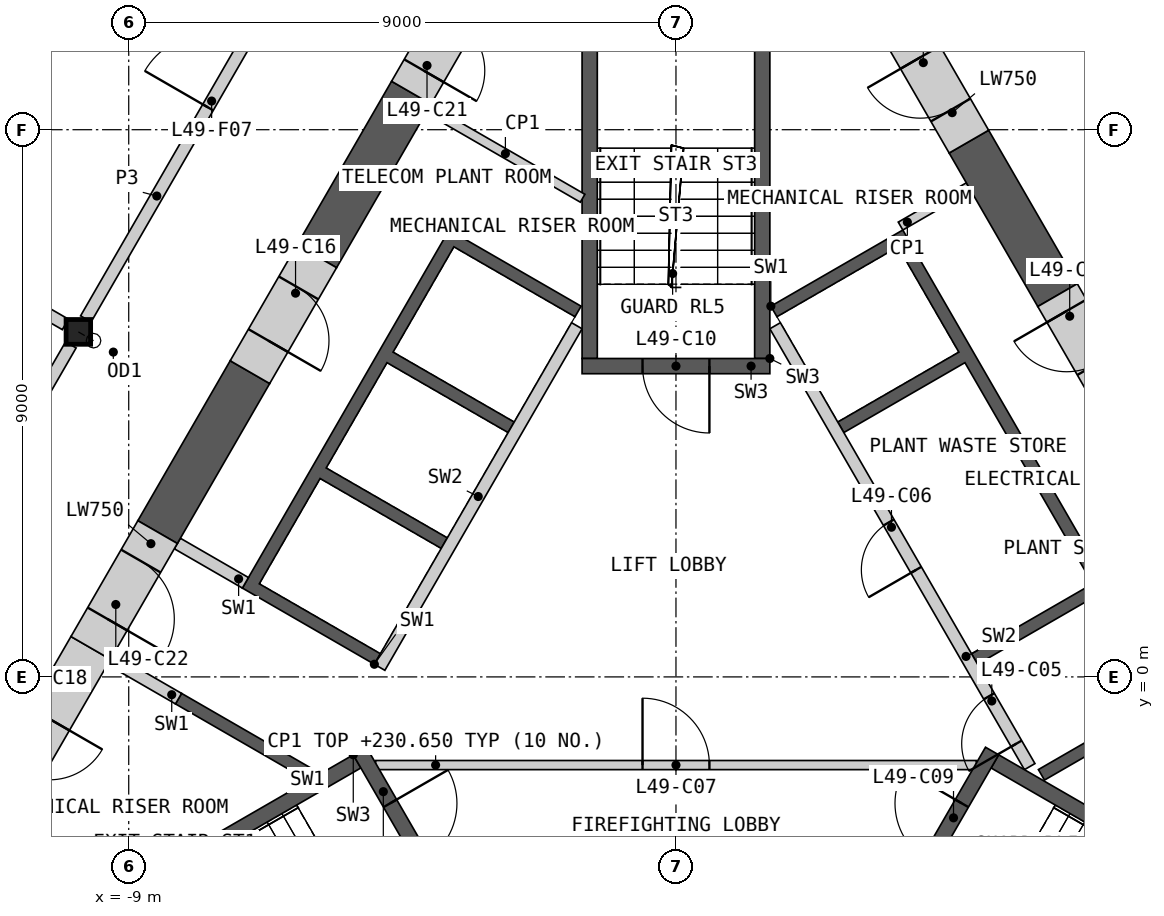
"""IFC4 building model, lengths in metres.
Left out: names, types, materials, properties, quantities, classifications, styles, units other than length and angle.
Written with IfcOpenShell. Run it as: python <this file> out.ifc"""

import sys

from ifc_helpers import new_model, si_unit, direction, frame, frame_2d, origin, origin_2d, place, context, subcontext, project, spatial, polyline, rectangle, i_section, outline, extrude, element, fill, save


model = new_model("IFC4")
c1 = context("Model", 3, precision=1e-05, world=origin(), true_north=direction((0.0, 1.0)))
c2 = subcontext(c1, "Body", "Model", "MODEL_VIEW")
j1 = project(units=[si_unit("LENGTHUNIT", "METRE"), si_unit("PLANEANGLEUNIT", "RADIAN")], contexts=[c1])
p1 = place(None, origin())
s1 = spatial("IfcSite", under=j1, at=p1, CompositionType="ELEMENT")
p2 = place(p1, origin())
s2 = spatial("IfcBuilding", under=s1, at=p2, CompositionType="ELEMENT")
p3 = place(p2, frame((0.0, 0.0, 226.0)))
s3 = spatial("IfcBuildingStorey", under=s2, at=p3, CompositionType="ELEMENT", Elevation=226.0)
p4 = place(p3, frame((-9.828, 5.675, 0.0), z_axis=(0.049916818753, -0.028858160841, 0.998336375055), x_axis=(0.500502949238, 0.865734831114, 0.0)))
e1 = element("IfcColumn", 1, at=p4, inside=s3, PredefinedType="COLUMN", context=c2, shape_type="SweptSolid", body=[
    extrude(i_section(OverallWidth=0.404, OverallDepth=0.407, WebThickness=0.027, FlangeThickness=0.044, at=origin_2d()), frame((0.0, 0.0, 0.012)), (0.0, 0.0, 1.0), 4.985),
])
p5 = place(p3, origin())
e2 = element("IfcWall", 2, at=p5, inside=s3, PredefinedType="SHEAR", context=c2, shape_type="SweptSolid", body=[
    extrude(outline(polyline([(1.561, 6.097), (3.731, 7.35), (7.131, 1.461), (4.96, 0.208), (4.861, 0.381), (6.852, 1.531), (4.752, 5.169), (2.76, 4.019), (2.66, 4.192), (4.652, 5.342), (3.652, 7.074), (1.66, 5.924), (1.561, 6.097)])), origin(), (0.0, 0.0, 1.0), 4.65),
])
p6 = place(p3, origin())
e3 = element("IfcWall", 3, at=p6, inside=s3, PredefinedType="SHEAR", context=c2, shape_type="SweptSolid", body=[
    extrude(outline(polyline([(8.231, -0.444), (6.061, -1.697), (5.96, -1.524), (8.131, -0.271), (8.231, -0.444)])), origin(), (0.0, 0.0, 1.0), 4.65),
])
p7 = place(p3, frame((5.817, -1.476, 0.0), z_axis=(0.0, 0.0, 1.0), x_axis=(-0.500002616675, 0.866023893041, 0.0)))
e4 = element("IfcWall", 4, at=p7, inside=s3, PredefinedType="SOLIDWALL", context=c2, shape_type="SweptSolid", body=[
    extrude(rectangle(XDim=8.373, YDim=0.2, at=frame_2d((4.187, 0.0))), origin(), (0.0, 0.0, 1.0), 4.65),
])
p8 = place(p7, frame((0.437, 0.0, 0.0)))
e5 = element("IfcOpeningElement", 5, at=p8, cuts=e4, PredefinedType="OPENING", context=c2, shape_type="SweptSolid", body=[
    extrude(rectangle(XDim=0.9, YDim=2.1, at=frame_2d((0.45, 1.05))), frame((0.0, 0.11, 0.0), z_axis=(0.0, -1.0, 0.0), x_axis=(1.0, 0.0, 0.0)), (0.0, 0.0, 1.0), 0.22),
])
p9 = place(p7, frame((3.737, 0.0, 0.0)))
e6 = element("IfcOpeningElement", 6, at=p9, cuts=e4, PredefinedType="OPENING", context=c2, shape_type="SweptSolid", body=[
    extrude(rectangle(XDim=0.9, YDim=2.1, at=frame_2d((0.45, 1.05))), frame((0.0, 0.11, 0.0), z_axis=(0.0, -1.0, 0.0), x_axis=(1.0, 0.0, 0.0)), (0.0, 0.0, 1.0), 0.22),
])
p10 = place(p3, origin())
e7 = element("IfcWall", 7, at=p10, inside=s3, PredefinedType="SHEAR", context=c2, shape_type="SweptSolid", body=[
    extrude(outline(polyline([(-6.061, -1.697), (-8.231, -0.444), (-8.131, -0.271), (-5.96, -1.524), (-6.061, -1.697)])), origin(), (0.0, 0.0, 1.0), 4.65),
])
p11 = place(p3, origin())
e8 = element("IfcWall", 8, at=p11, inside=s3, PredefinedType="SHEAR", context=c2, shape_type="SweptSolid", body=[
    extrude(outline(polyline([(-4.96, 0.208), (-7.131, 1.461), (-3.731, 7.35), (-1.561, 6.097), (-1.66, 5.924), (-3.652, 7.074), (-4.652, 5.342), (-2.66, 4.192), (-2.76, 4.019), (-4.752, 5.169), (-5.752, 3.437), (-3.76, 2.287), (-3.861, 2.113), (-5.852, 3.263), (-6.852, 1.531), (-4.861, 0.381), (-4.96, 0.208)])), origin(), (0.0, 0.0, 1.0), 4.65),
])
p12 = place(p3, frame((-1.631, 5.776, 0.0), z_axis=(0.0, 0.0, 1.0), x_axis=(-0.499992876559, -0.866029516466, 0.0)))
e9 = element("IfcWall", 9, at=p12, inside=s3, PredefinedType="SOLIDWALL", context=c2, shape_type="SweptSolid", body=[
    extrude(rectangle(XDim=6.486, YDim=0.2, at=frame_2d((3.243, 0.0))), origin(), (0.0, 0.0, 1.0), 4.65),
])
for number, where, z_axis, x_axis in (
    (10, (-7.081, 1.548, 0.0), (0.0, 0.0, 1.0), (-0.866, 0.5, 0.0)),
    (11, (-8.181, -0.357, 0.0), (0.0, 0.0, 1.0), (-0.866, 0.5, 0.0)),
):
    element("IfcWall", number, at=place(p3, frame(where, z_axis=z_axis, x_axis=x_axis)), inside=s3, PredefinedType="SHEAR", context=c2, shape_type="SweptSolid", body=[
        extrude(rectangle(XDim=1.293, YDim=0.2, at=frame_2d((0.646, 0.0))), origin(), (0.0, 0.0, 1.0), 4.65),
    ])
p13 = place(p3, frame((-4.941, -1.45, 0.0), z_axis=(0.0, 0.0, 1.0), x_axis=(1.0, 0.0, 0.0)))
e12 = element("IfcWall", 12, at=p13, inside=s3, PredefinedType="PARTITIONING", context=c2, shape_type="SweptSolid", body=[
    extrude(rectangle(XDim=9.882, YDim=0.15, at=frame_2d((4.941, 0.0))), origin(), (0.0, 0.0, 1.0), 4.65),
])
p14 = place(p13, frame((4.391, 0.0, 0.0)))
e13 = element("IfcOpeningElement", 13, at=p14, cuts=e12, PredefinedType="OPENING", context=c2, shape_type="SweptSolid", body=[
    extrude(rectangle(XDim=1.1, YDim=2.1, at=frame_2d((0.55, 1.05))), frame((0.0, 0.085, 0.0), z_axis=(0.0, -1.0, 0.0), x_axis=(1.0, 0.0, 0.0)), (0.0, 0.0, 1.0), 0.17),
])
p15 = place(p3, origin())
e14 = element("IfcWall", 14, at=p15, inside=s3, PredefinedType="SHEAR", context=c2, shape_type="SweptSolid", body=[
    extrude(outline(polyline([(-5.307, -1.281), (-10.374, -4.206), (-10.032, -4.298), (-5.182, -1.498), (-5.307, -1.281)])), origin(), (0.0, 0.0, 1.0), 4.65),
])
p16 = place(p3, frame((-5.199, -1.219, 0.0), z_axis=(0.0, 0.0, 1.0), x_axis=(0.499982516597, -0.866035497597, 0.0)))
e15 = element("IfcWall", 15, at=p16, inside=s3, PredefinedType="SHEAR", context=c2, shape_type="SweptSolid", body=[
    extrude(rectangle(XDim=3.088, YDim=0.25, at=frame_2d((1.544, 0.0))), origin(), (0.0, 0.0, 1.0), 4.65),
])
p17 = place(p16, frame((0.994, 0.0, 0.0)))
e16 = element("IfcOpeningElement", 16, at=p17, cuts=e15, PredefinedType="OPENING", context=c2, shape_type="SweptSolid", body=[
    extrude(rectangle(XDim=1.1, YDim=2.1, at=frame_2d((0.55, 1.05))), frame((0.0, 0.135, 0.0), z_axis=(0.0, -1.0, 0.0), x_axis=(1.0, 0.0, 0.0)), (0.0, 0.0, 1.0), 0.27),
])
p18 = place(p3, origin())
e17 = element("IfcWall", 17, at=p18, inside=s3, PredefinedType="SHEAR", context=c2, shape_type="SweptSolid", body=[
    extrude(outline(polyline([(10.032, -4.298), (10.374, -4.206), (5.307, -1.281), (5.182, -1.498), (10.032, -4.298)])), origin(), (0.0, 0.0, 1.0), 4.65),
])
p19 = place(p3, frame((3.655, -3.893, 0.0), z_axis=(0.0, 0.0, 1.0), x_axis=(0.499982516597, 0.866035497597, 0.0)))
e18 = element("IfcWall", 18, at=p19, inside=s3, PredefinedType="SHEAR", context=c2, shape_type="SweptSolid", body=[
    extrude(rectangle(XDim=3.088, YDim=0.25, at=frame_2d((1.544, 0.0))), origin(), (0.0, 0.0, 1.0), 4.65),
])
p20 = place(p19, frame((0.994, 0.0, 0.0)))
e19 = element("IfcOpeningElement", 19, at=p20, cuts=e18, PredefinedType="OPENING", context=c2, shape_type="SweptSolid", body=[
    extrude(rectangle(XDim=1.1, YDim=2.1, at=frame_2d((0.55, 1.05))), frame((0.0, 0.135, 0.0), z_axis=(0.0, -1.0, 0.0), x_axis=(1.0, 0.0, 0.0)), (0.0, 0.0, 1.0), 0.27),
])
p21 = place(p3, origin())
e20 = element("IfcWall", 20, at=p21, inside=s3, PredefinedType="SHEAR", context=c2, shape_type="SweptSolid", body=[
    extrude(outline(polyline([(1.544, 5.237), (1.544, 11.087), (1.294, 10.837), (1.294, 5.237), (1.544, 5.237)])), origin(), (0.0, 0.0, 1.0), 4.65),
])
p22 = place(p3, origin())
e21 = element("IfcWall", 21, at=p22, inside=s3, PredefinedType="SHEAR", context=c2, shape_type="SweptSolid", body=[
    extrude(outline(polyline([(-1.294, 10.837), (-1.544, 11.087), (-1.544, 5.237), (-1.294, 5.237), (-1.294, 10.837)])), origin(), (0.0, 0.0, 1.0), 4.65),
])
p23 = place(p3, frame((1.544, 5.112, 0.0), z_axis=(0.0, 0.0, 1.0), x_axis=(-1.0, 0.0, 0.0)))
e22 = element("IfcWall", 22, at=p23, inside=s3, PredefinedType="SHEAR", context=c2, shape_type="SweptSolid", body=[
    extrude(rectangle(XDim=3.088, YDim=0.25, at=frame_2d((1.544, 0.0))), origin(), (0.0, 0.0, 1.0), 4.65),
])
p24 = place(p23, frame((0.994, 0.0, 0.0)))
e23 = element("IfcOpeningElement", 23, at=p24, cuts=e22, PredefinedType="OPENING", context=c2, shape_type="SweptSolid", body=[
    extrude(rectangle(XDim=1.1, YDim=2.1, at=frame_2d((0.55, 1.05))), frame((0.0, 0.135, 0.0), z_axis=(0.0, -1.0, 0.0), x_axis=(1.0, 0.0, 0.0)), (0.0, 0.0, 1.0), 0.27),
])
p25 = place(p3, frame((3.693, 7.415, 0.0), z_axis=(0.0, 0.0, 1.0), x_axis=(0.866003189247, 0.500038474733, 0.0)))
e24 = element("IfcWall", 24, at=p25, inside=s3, PredefinedType="PARTITIONING", context=c2, shape_type="SweptSolid", body=[
    extrude(rectangle(XDim=1.293, YDim=0.15, at=frame_2d((0.646, 0.0))), origin(), (0.0, 0.0, 1.0), 4.65),
])
p26 = place(p3, frame((-4.075, 9.339, 0.0), z_axis=(0.0, 0.0, 1.0), x_axis=(0.865995658863, -0.500051516177, 0.0)))
e25 = element("IfcWall", 25, at=p26, inside=s3, PredefinedType="PARTITIONING", context=c2, shape_type="SweptSolid", body=[
    extrude(rectangle(XDim=2.933, YDim=0.15, at=frame_2d((1.466, 0.0))), origin(), (0.0, 0.0, 1.0), 4.65),
])
p27 = place(p3, frame((6.275, 6.279, 0.0), z_axis=(0.0, 0.0, 1.0), x_axis=(-0.500029273391, 0.866008502124, 0.0)))
e26 = element("IfcWall", 26, at=p27, inside=s3, PredefinedType="SHEAR", context=c2, shape_type="SweptSolid", body=[
    extrude(rectangle(XDim=2.916, YDim=0.75, at=frame_2d((1.458, 0.0))), origin(), (0.0, 0.0, 1.0), 4.65),
])
p28 = place(p3, frame((-4.353, 9.609, 0.0), z_axis=(0.0, 0.0, 1.0), x_axis=(-0.500017123375, -0.866015517374, 0.0)))
e27 = element("IfcWall", 27, at=p28, inside=s3, PredefinedType="SHEAR", context=c2, shape_type="SweptSolid", body=[
    extrude(rectangle(XDim=3.108, YDim=0.75, at=frame_2d((1.554, 0.0))), origin(), (0.0, 0.0, 1.0), 4.65),
])
p29 = place(p3, frame((-7.006, 5.012, 0.0), z_axis=(0.0, 0.0, 1.0), x_axis=(-0.49996826437, -0.866043725583, 0.0)))
e28 = element("IfcWall", 28, at=p29, inside=s3, PredefinedType="SHEAR", context=c2, shape_type="SweptSolid", body=[
    extrude(rectangle(XDim=3.038, YDim=0.75, at=frame_2d((1.519, 0.0))), origin(), (0.0, 0.0, 1.0), 4.65),
])
p30 = place(p3, frame((7.375, 4.374, 0.0), z_axis=(0.0, 0.0, 1.0), x_axis=(-0.499946605688, 0.86605622881, 0.0)))
e29 = element("IfcWall", 29, at=p30, inside=s3, PredefinedType="SHEAR", context=c2, shape_type="SweptSolid", body=[
    extrude(rectangle(XDim=2.2, YDim=0.75, at=frame_2d((1.1, 0.0))), origin(), (0.0, 0.0, 1.0), 4.65),
])
p31 = place(p30, frame((0.9, 0.0, 0.0)))
e30 = element("IfcOpeningElement", 30, at=p31, cuts=e29, PredefinedType="OPENING", context=c2, shape_type="SweptSolid", body=[
    extrude(rectangle(XDim=1.0, YDim=2.1, at=frame_2d((0.5, 1.05))), frame((0.0, 0.385, 0.0), z_axis=(0.0, -1.0, 0.0), x_axis=(1.0, 0.0, 0.0)), (0.0, 0.0, 1.0), 0.77),
])
p32 = place(p3, frame((-5.906, 6.918, 0.0), z_axis=(0.0, 0.0, 1.0), x_axis=(-0.499946605688, -0.86605622881, 0.0)))
e31 = element("IfcWall", 31, at=p32, inside=s3, PredefinedType="SHEAR", context=c2, shape_type="SweptSolid", body=[
    extrude(rectangle(XDim=2.2, YDim=0.75, at=frame_2d((1.1, 0.0))), origin(), (0.0, 0.0, 1.0), 4.65),
])
p33 = place(p32, frame((0.6, 0.0, 0.0)))
e32 = element("IfcOpeningElement", 32, at=p33, cuts=e31, PredefinedType="OPENING", context=c2, shape_type="SweptSolid", body=[
    extrude(rectangle(XDim=1.0, YDim=2.1, at=frame_2d((0.5, 1.05))), frame((0.0, 0.385, 0.0), z_axis=(0.0, -1.0, 0.0), x_axis=(1.0, 0.0, 0.0)), (0.0, 0.0, 1.0), 0.77),
])
p34 = place(p3, frame((-9.625, 0.477, 0.0), z_axis=(0.0, 0.0, 1.0), x_axis=(-0.500005104963, -0.866022456413, 0.0)))
e33 = element("IfcWall", 33, at=p34, inside=s3, PredefinedType="SHEAR", context=c2, shape_type="SweptSolid", body=[
    extrude(rectangle(XDim=2.941, YDim=0.75, at=frame_2d((1.47, 0.0))), origin(), (0.0, 0.0, 1.0), 4.65),
])
p35 = place(p34, frame((1.35, 0.0, 0.0)))
e34 = element("IfcOpeningElement", 34, at=p35, cuts=e33, PredefinedType="OPENING", context=c2, shape_type="SweptSolid", body=[
    extrude(rectangle(XDim=1.0, YDim=2.1, at=frame_2d((0.5, 1.05))), frame((0.0, 0.385, 0.0), z_axis=(0.0, -1.0, 0.0), x_axis=(1.0, 0.0, 0.0)), (0.0, 0.0, 1.0), 0.77),
])
p36 = place(p3, frame((4.817, 8.804, 0.0), z_axis=(0.0, 0.0, 1.0), x_axis=(-0.50002983664, 0.866008176907, 0.0)))
e35 = element("IfcWall", 35, at=p36, inside=s3, PredefinedType="SHEAR", context=c2, shape_type="SweptSolid", body=[
    extrude(rectangle(XDim=2.2, YDim=0.75, at=frame_2d((1.1, 0.0))), origin(), (0.0, 0.0, 1.0), 4.65),
])
p37 = place(p36, frame((0.6, 0.0, 0.0)))
e36 = element("IfcOpeningElement", 36, at=p37, cuts=e35, PredefinedType="OPENING", context=c2, shape_type="SweptSolid", body=[
    extrude(rectangle(XDim=1.0, YDim=2.1, at=frame_2d((0.5, 1.05))), frame((0.0, 0.385, 0.0), z_axis=(0.0, -1.0, 0.0), x_axis=(1.0, 0.0, 0.0)), (0.0, 0.0, 1.0), 0.77),
])
p38 = place(p3, frame((-3.444, 11.182, 0.0), z_axis=(0.0, 0.0, 1.0), x_axis=(-0.500071537347, -0.865984097738, 0.0)))
e37 = element("IfcWall", 37, at=p38, inside=s3, PredefinedType="SHEAR", context=c2, shape_type="SweptSolid", body=[
    extrude(rectangle(XDim=1.816, YDim=0.75, at=frame_2d((0.908, 0.0))), origin(), (0.0, 0.0, 1.0), 4.65),
])
p39 = place(p38, frame((0.4, 0.0, 0.0)))
e38 = element("IfcOpeningElement", 38, at=p39, cuts=e37, PredefinedType="OPENING", context=c2, shape_type="SweptSolid", body=[
    extrude(rectangle(XDim=1.0, YDim=2.1, at=frame_2d((0.5, 1.05))), frame((0.0, 0.385, 0.0), z_axis=(0.0, -1.0, 0.0), x_axis=(1.0, 0.0, 0.0)), (0.0, 0.0, 1.0), 0.77),
])
p40 = place(p3, frame((-8.525, 2.382, 0.0), z_axis=(0.0, 0.0, 1.0), x_axis=(-0.500077893725, -0.86598042715, 0.0)))
e39 = element("IfcWall", 39, at=p40, inside=s3, PredefinedType="SHEAR", context=c2, shape_type="SweptSolid", body=[
    extrude(rectangle(XDim=2.2, YDim=0.75, at=frame_2d((1.1, 0.0))), origin(), (0.0, 0.0, 1.0), 4.65),
])
p41 = place(p40, frame((0.55, 0.0, 0.0)))
e40 = element("IfcOpeningElement", 40, at=p41, cuts=e39, PredefinedType="OPENING", context=c2, shape_type="SweptSolid", body=[
    extrude(rectangle(XDim=1.1, YDim=2.1, at=frame_2d((0.55, 1.05))), frame((0.0, 0.385, 0.0), z_axis=(0.0, -1.0, 0.0), x_axis=(1.0, 0.0, 0.0)), (0.0, 0.0, 1.0), 0.77),
])
p42 = place(p3, frame((-9.705, 5.888, 0.0), z_axis=(0.0, 0.0, 1.0), x_axis=(0.50000393355, 0.866023132736, 0.0)))
e41 = element("IfcWall", 41, at=p42, inside=s3, PredefinedType="PARTITIONING", context=c2, shape_type="SweptSolid", body=[
    extrude(rectangle(XDim=9.335, YDim=0.2, at=frame_2d((4.667, 0.0))), origin(), (0.0, 0.0, 1.0), 4.65),
])
p43 = place(p42, frame((4.017, 0.0, 0.0)))
e42 = element("IfcOpeningElement", 42, at=p43, cuts=e41, PredefinedType="OPENING", context=c2, shape_type="SweptSolid", body=[
    extrude(rectangle(XDim=1.2, YDim=2.1, at=frame_2d((0.6, 1.05))), frame((0.0, 0.11, 0.0), z_axis=(0.0, -1.0, 0.0), x_axis=(1.0, 0.0, 0.0)), (0.0, 0.0, 1.0), 0.22),
])
p44 = place(p3, frame((5.038, 13.972, 0.0), z_axis=(0.0, 0.0, 1.0), x_axis=(0.50000393355, -0.866023132736, 0.0)))
e43 = element("IfcWall", 43, at=p44, inside=s3, PredefinedType="PARTITIONING", context=c2, shape_type="SweptSolid", body=[
    extrude(rectangle(XDim=9.335, YDim=0.2, at=frame_2d((4.667, 0.0))), origin(), (0.0, 0.0, 1.0), 4.65),
])
p45 = place(p44, frame((4.118, 0.0, 0.0)))
e44 = element("IfcOpeningElement", 44, at=p45, cuts=e43, PredefinedType="OPENING", context=c2, shape_type="SweptSolid", body=[
    extrude(rectangle(XDim=1.2, YDim=2.1, at=frame_2d((0.6, 1.05))), frame((0.0, 0.11, 0.0), z_axis=(0.0, -1.0, 0.0), x_axis=(1.0, 0.0, 0.0)), (0.0, 0.0, 1.0), 0.22),
])
p46 = place(p3, frame((-14.619, -2.624, 0.0), z_axis=(0.0, 0.0, 1.0), x_axis=(0.50000393355, 0.866023132736, 0.0)))
e45 = element("IfcWall", 45, at=p46, inside=s3, PredefinedType="PARTITIONING", context=c2, shape_type="SweptSolid", body=[
    extrude(rectangle(XDim=9.335, YDim=0.2, at=frame_2d((4.667, 0.0))), origin(), (0.0, 0.0, 1.0), 4.65),
])
p47 = place(p46, frame((4.118, 0.0, 0.0)))
e46 = element("IfcOpeningElement", 46, at=p47, cuts=e45, PredefinedType="OPENING", context=c2, shape_type="SweptSolid", body=[
    extrude(rectangle(XDim=1.2, YDim=2.1, at=frame_2d((0.6, 1.05))), frame((0.0, 0.11, 0.0), z_axis=(0.0, -1.0, 0.0), x_axis=(1.0, 0.0, 0.0)), (0.0, 0.0, 1.0), 0.22),
])
p48 = place(p3, frame((-21.0, 12.124, 0.0), z_axis=(0.0, 0.0, 1.0), x_axis=(0.866025883649, -0.499999168849, 0.0)))
e47 = element("IfcWall", 47, at=p48, inside=s3, PredefinedType="PARTITIONING", context=c2, shape_type="SweptSolid", body=[
    extrude(rectangle(XDim=12.652, YDim=0.2, at=frame_2d((6.326, 0.0))), origin(), (0.0, 0.0, 1.0), 4.65),
])
p49 = place(p8, origin())
e48 = element("IfcDoor", 48, at=p49, inside=s3, OperationType="SINGLE_SWING_LEFT", PredefinedType="DOOR", context=c2, shape_type="SweptSolid", body=[
    extrude(rectangle(XDim=0.9, YDim=2.1, at=frame_2d((0.45, 1.05))), frame((0.0, 0.025, 0.0), z_axis=(0.0, -1.0, 0.0), x_axis=(1.0, 0.0, 0.0)), (0.0, 0.0, 1.0), 0.05),
])
fill(e5, e48)
p50 = place(p9, origin())
e49 = element("IfcDoor", 49, at=p50, inside=s3, OperationType="SINGLE_SWING_LEFT", PredefinedType="DOOR", context=c2, shape_type="SweptSolid", body=[
    extrude(rectangle(XDim=0.9, YDim=2.1, at=frame_2d((0.45, 1.05))), frame((0.0, 0.025, 0.0), z_axis=(0.0, -1.0, 0.0), x_axis=(1.0, 0.0, 0.0)), (0.0, 0.0, 1.0), 0.05),
])
fill(e6, e49)
p51 = place(p14, origin())
e50 = element("IfcDoor", 50, at=p51, inside=s3, OperationType="SINGLE_SWING_LEFT", PredefinedType="DOOR", context=c2, shape_type="SweptSolid", body=[
    extrude(rectangle(XDim=1.1, YDim=2.1, at=frame_2d((0.55, 1.05))), frame((0.0, 0.025, 0.0), z_axis=(0.0, -1.0, 0.0), x_axis=(1.0, 0.0, 0.0)), (0.0, 0.0, 1.0), 0.05),
])
fill(e13, e50)
p52 = place(p17, origin())
e51 = element("IfcDoor", 51, at=p52, inside=s3, OperationType="SINGLE_SWING_LEFT", PredefinedType="DOOR", context=c2, shape_type="SweptSolid", body=[
    extrude(rectangle(XDim=1.1, YDim=2.1, at=frame_2d((0.55, 1.05))), frame((0.0, 0.025, 0.0), z_axis=(0.0, -1.0, 0.0), x_axis=(1.0, 0.0, 0.0)), (0.0, 0.0, 1.0), 0.05),
])
fill(e16, e51)
p53 = place(p20, origin())
e52 = element("IfcDoor", 52, at=p53, inside=s3, OperationType="SINGLE_SWING_RIGHT", PredefinedType="DOOR", context=c2, shape_type="SweptSolid", body=[
    extrude(rectangle(XDim=1.1, YDim=2.1, at=frame_2d((0.55, 1.05))), frame((0.0, 0.025, 0.0), z_axis=(0.0, -1.0, 0.0), x_axis=(1.0, 0.0, 0.0)), (0.0, 0.0, 1.0), 0.05),
])
fill(e19, e52)
p54 = place(p24, origin())
e53 = element("IfcDoor", 53, at=p54, inside=s3, OperationType="SINGLE_SWING_LEFT", PredefinedType="DOOR", context=c2, shape_type="SweptSolid", body=[
    extrude(rectangle(XDim=1.1, YDim=2.1, at=frame_2d((0.55, 1.05))), frame((0.0, 0.025, 0.0), z_axis=(0.0, -1.0, 0.0), x_axis=(1.0, 0.0, 0.0)), (0.0, 0.0, 1.0), 0.05),
])
fill(e23, e53)
p55 = place(p31, origin())
e54 = element("IfcDoor", 54, at=p55, inside=s3, OperationType="SINGLE_SWING_RIGHT", PredefinedType="DOOR", context=c2, shape_type="SweptSolid", body=[
    extrude(rectangle(XDim=1.0, YDim=2.1, at=frame_2d((0.5, 1.05))), frame((0.0, 0.13, 0.0), z_axis=(0.0, -1.0, 0.0), x_axis=(1.0, 0.0, 0.0)), (0.0, 0.0, 1.0), 0.05),
])
fill(e30, e54)
p56 = place(p33, origin())
e55 = element("IfcDoor", 55, at=p56, inside=s3, OperationType="SINGLE_SWING_RIGHT", PredefinedType="DOOR", context=c2, shape_type="SweptSolid", body=[
    extrude(rectangle(XDim=1.0, YDim=2.1, at=frame_2d((0.5, 1.05))), frame((0.0, 0.13, 0.0), z_axis=(0.0, -1.0, 0.0), x_axis=(1.0, 0.0, 0.0)), (0.0, 0.0, 1.0), 0.05),
])
fill(e32, e55)
p57 = place(p35, origin())
e56 = element("IfcDoor", 56, at=p57, inside=s3, OperationType="SINGLE_SWING_LEFT", PredefinedType="DOOR", context=c2, shape_type="SweptSolid", body=[
    extrude(rectangle(XDim=1.0, YDim=2.1, at=frame_2d((0.5, 1.05))), frame((0.0, 0.13, 0.0), z_axis=(0.0, -1.0, 0.0), x_axis=(1.0, 0.0, 0.0)), (0.0, 0.0, 1.0), 0.05),
])
fill(e34, e56)
p58 = place(p37, origin())
e57 = element("IfcDoor", 57, at=p58, inside=s3, OperationType="SINGLE_SWING_RIGHT", PredefinedType="DOOR", context=c2, shape_type="SweptSolid", body=[
    extrude(rectangle(XDim=1.0, YDim=2.1, at=frame_2d((0.5, 1.05))), frame((0.0, 0.13, 0.0), z_axis=(0.0, -1.0, 0.0), x_axis=(1.0, 0.0, 0.0)), (0.0, 0.0, 1.0), 0.05),
])
fill(e36, e57)
p59 = place(p39, origin())
e58 = element("IfcDoor", 58, at=p59, inside=s3, OperationType="SINGLE_SWING_RIGHT", PredefinedType="DOOR", context=c2, shape_type="SweptSolid", body=[
    extrude(rectangle(XDim=1.0, YDim=2.1, at=frame_2d((0.5, 1.05))), frame((0.0, 0.13, 0.0), z_axis=(0.0, -1.0, 0.0), x_axis=(1.0, 0.0, 0.0)), (0.0, 0.0, 1.0), 0.05),
])
fill(e38, e58)
p60 = place(p41, origin())
e59 = element("IfcDoor", 59, at=p60, inside=s3, OperationType="SINGLE_SWING_RIGHT", PredefinedType="DOOR", context=c2, shape_type="SweptSolid", body=[
    extrude(rectangle(XDim=1.1, YDim=2.1, at=frame_2d((0.55, 1.05))), frame((0.0, 0.13, 0.0), z_axis=(0.0, -1.0, 0.0), x_axis=(1.0, 0.0, 0.0)), (0.0, 0.0, 1.0), 0.05),
])
fill(e40, e59)
p61 = place(p43, origin())
e60 = element("IfcDoor", 60, at=p61, inside=s3, OperationType="SINGLE_SWING_LEFT", PredefinedType="DOOR", context=c2, shape_type="SweptSolid", body=[
    extrude(rectangle(XDim=1.2, YDim=2.1, at=frame_2d((0.6, 1.05))), frame((0.0, 0.025, 0.0), z_axis=(0.0, -1.0, 0.0), x_axis=(1.0, 0.0, 0.0)), (0.0, 0.0, 1.0), 0.05),
])
fill(e42, e60)
save(model, sys.argv[1])
